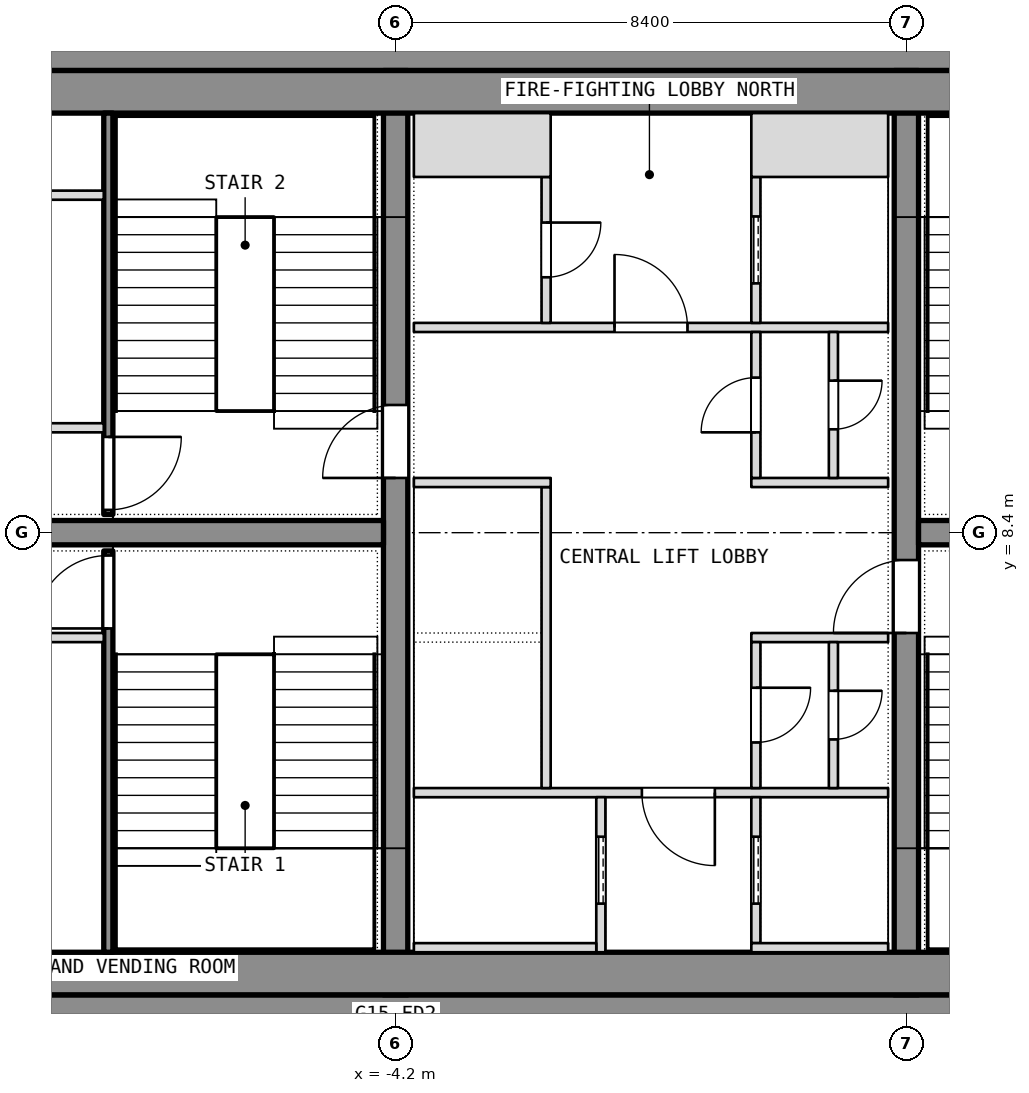
"""IFC4 building model, lengths in metres.
Left out: names, types, materials, properties, quantities, classifications, styles, units other than length and angle.
Written with IfcOpenShell. Run it as: python <this file> out.ifc"""

import sys

from ifc_helpers import new_model, si_unit, direction, frame, frame_2d, origin, place, context, subcontext, project, spatial, rectangle, extrude, element, fill, save


model = new_model("IFC4")
c1 = context("Model", 3, precision=1e-05, world=origin(), true_north=direction((0.0, 1.0)))
c2 = subcontext(c1, "Body", "Model", "MODEL_VIEW")
j1 = project(units=[si_unit("LENGTHUNIT", "METRE"), si_unit("PLANEANGLEUNIT", "RADIAN")], contexts=[c1])
p1 = place(None, origin())
s1 = spatial("IfcSite", under=j1, at=p1, CompositionType="ELEMENT")
p2 = place(p1, origin())
s2 = spatial("IfcBuilding", under=s1, at=p2, CompositionType="ELEMENT")
p3 = place(p2, frame((0.0, 0.0, 187.7)))
s3 = spatial("IfcBuildingStorey", under=s2, at=p3, CompositionType="ELEMENT", Elevation=187.7)
for number, where, z_axis, x_axis in (
    (1, (-11.1, 0.4, 0.0), (0.0, 0.0, 1.0), (1.0, 0.0, 0.0)),
    (2, (-11.1, 16.4, 0.0), (0.0, 0.0, 1.0), (1.0, 0.0, 0.0)),
):
    element("IfcWall", number, at=place(p3, frame(where, z_axis=z_axis, x_axis=x_axis)), inside=s3, PredefinedType="SHEAR", context=c2, shape_type="SweptSolid", body=[
        extrude(rectangle(XDim=22.2, YDim=0.8, at=frame_2d((11.1, 0.0))), origin(), (0.0, 0.0, 1.0), 3.6),
    ])
p4 = place(p3, frame((-4.2, 0.8, 0.0), z_axis=(0.0, 0.0, 1.0), x_axis=(0.0, 1.0, 0.0)))
e3 = element("IfcWall", 3, at=p4, inside=s3, PredefinedType="SHEAR", context=c2, shape_type="SweptSolid", body=[
    extrude(rectangle(XDim=15.2, YDim=0.4, at=frame_2d((7.6, 0.0))), origin(), (0.0, 0.0, 1.0), 3.6),
])
p5 = place(p4, frame((8.5, 0.0, 0.0)))
e4 = element("IfcOpeningElement", 4, at=p5, cuts=e3, PredefinedType="OPENING", context=c2, shape_type="SweptSolid", body=[
    extrude(rectangle(XDim=1.2, YDim=2.1, at=frame_2d((0.6, 1.05))), frame((0.0, 0.2, 0.0), z_axis=(0.0, -1.0, 0.0), x_axis=(1.0, 0.0, 0.0)), (0.0, 0.0, 1.0), 0.4),
])
p6 = place(p3, frame((4.2, 0.8, 0.0), z_axis=(0.0, 0.0, 1.0), x_axis=(0.0, 1.0, 0.0)))
e5 = element("IfcWall", 5, at=p6, inside=s3, PredefinedType="SHEAR", context=c2, shape_type="SweptSolid", body=[
    extrude(rectangle(XDim=15.2, YDim=0.4, at=frame_2d((7.6, 0.0))), origin(), (0.0, 0.0, 1.0), 3.6),
])
p7 = place(p6, frame((5.95, 0.0, 0.0)))
e6 = element("IfcOpeningElement", 6, at=p7, cuts=e5, PredefinedType="OPENING", context=c2, shape_type="SweptSolid", body=[
    extrude(rectangle(XDim=1.2, YDim=2.1, at=frame_2d((0.6, 1.05))), frame((0.0, 0.2, 0.0), z_axis=(0.0, -1.0, 0.0), x_axis=(1.0, 0.0, 0.0)), (0.0, 0.0, 1.0), 0.4),
])
for number, where, z_axis, x_axis in (
    (7, (-11.1, 8.4, 0.0), (0.0, 0.0, 1.0), (1.0, 0.0, 0.0)),
    (8, (4.4, 8.4, 0.0), (0.0, 0.0, 1.0), (1.0, 0.0, 0.0)),
):
    element("IfcWall", number, at=place(p3, frame(where, z_axis=z_axis, x_axis=x_axis)), inside=s3, PredefinedType="SHEAR", context=c2, shape_type="SweptSolid", body=[
        extrude(rectangle(XDim=6.7, YDim=0.4, at=frame_2d((3.35, 0.0))), origin(), (0.0, 0.0, 1.0), 3.6),
    ])
for number, where, z_axis, x_axis in (
    (9, (-11.1, 1.15, 0.0), (0.0, 0.0, 1.0), (1.0, 0.0, 0.0)),
    (10, (-11.1, 15.65, 0.0), (0.0, 0.0, 1.0), (1.0, 0.0, 0.0)),
):
    element("IfcWall", number, at=place(p3, frame(where, z_axis=z_axis, x_axis=x_axis)), inside=s3, PredefinedType="PARTITIONING", context=c2, shape_type="SweptSolid", body=[
        extrude(rectangle(XDim=22.2, YDim=0.7, at=frame_2d((11.1, 0.0))), origin(), (0.0, 0.0, 1.0), 3.34),
    ])
p8 = place(p3, frame((-8.925, 1.5, 0.0), z_axis=(0.0, 0.0, 1.0), x_axis=(0.0, 1.0, 0.0)))
e11 = element("IfcWall", 11, at=p8, inside=s3, PredefinedType="SHEAR", context=c2, shape_type="SweptSolid", body=[
    extrude(rectangle(XDim=6.6, YDim=0.15, at=frame_2d((3.3, 0.0))), origin(), (0.0, 0.0, 1.0), 3.34),
])
p9 = place(p8, frame((5.325, 0.0, 0.0)))
e12 = element("IfcOpeningElement", 12, at=p9, cuts=e11, PredefinedType="OPENING", context=c2, shape_type="SweptSolid", body=[
    extrude(rectangle(XDim=1.2, YDim=2.1, at=frame_2d((0.6, 1.05))), frame((0.0, 0.075, 0.0), z_axis=(0.0, -1.0, 0.0), x_axis=(1.0, 0.0, 0.0)), (0.0, 0.0, 1.0), 0.15),
])
p10 = place(p3, frame((-11.1, 6.675, 0.0), z_axis=(0.0, 0.0, 1.0), x_axis=(1.0, 0.0, 0.0)))
e13 = element("IfcWall", 13, at=p10, inside=s3, PredefinedType="PARTITIONING", context=c2, shape_type="SweptSolid", body=[
    extrude(rectangle(XDim=2.1, YDim=0.15, at=frame_2d((1.05, 0.0))), origin(), (0.0, 0.0, 1.0), 3.34),
])
p11 = place(p3, frame((-8.925, 8.7, 0.0), z_axis=(0.0, 0.0, 1.0), x_axis=(0.0, 1.0, 0.0)))
e14 = element("IfcWall", 14, at=p11, inside=s3, PredefinedType="SHEAR", context=c2, shape_type="SweptSolid", body=[
    extrude(rectangle(XDim=6.6, YDim=0.15, at=frame_2d((3.3, 0.0))), origin(), (0.0, 0.0, 1.0), 3.34),
])
p12 = place(p11, frame((0.075, 0.0, 0.0)))
e15 = element("IfcOpeningElement", 15, at=p12, cuts=e14, PredefinedType="OPENING", context=c2, shape_type="SweptSolid", body=[
    extrude(rectangle(XDim=1.2, YDim=2.1, at=frame_2d((0.6, 1.05))), frame((0.0, 0.075, 0.0), z_axis=(0.0, -1.0, 0.0), x_axis=(1.0, 0.0, 0.0)), (0.0, 0.0, 1.0), 0.15),
])
for number, where, z_axis, x_axis in (
    (16, (-11.1, 10.125, 0.0), (0.0, 0.0, 1.0), (1.0, 0.0, 0.0)),
    (17, (-11.1, 13.95, 0.0), (0.0, 0.0, 1.0), (1.0, 0.0, 0.0)),
):
    element("IfcWall", number, at=place(p3, frame(where, z_axis=z_axis, x_axis=x_axis)), inside=s3, PredefinedType="PARTITIONING", context=c2, shape_type="SweptSolid", body=[
        extrude(rectangle(XDim=2.1, YDim=0.15, at=frame_2d((1.05, 0.0))), origin(), (0.0, 0.0, 1.0), 3.34),
    ])
p13 = place(p3, frame((-3.9, 4.125, 0.0), z_axis=(0.0, 0.0, 1.0), x_axis=(1.0, 0.0, 0.0)))
e18 = element("IfcWall", 18, at=p13, inside=s3, PredefinedType="PARTITIONING", context=c2, shape_type="SweptSolid", body=[
    extrude(rectangle(XDim=7.8, YDim=0.15, at=frame_2d((3.9, 0.0))), origin(), (0.0, 0.0, 1.0), 3.34),
])
p14 = place(p13, frame((3.75, 0.0, 0.0)))
e19 = element("IfcOpeningElement", 19, at=p14, cuts=e18, PredefinedType="OPENING", context=c2, shape_type="SweptSolid", body=[
    extrude(rectangle(XDim=1.2, YDim=2.1, at=frame_2d((0.6, 1.05))), frame((0.0, 0.075, 0.0), z_axis=(0.0, -1.0, 0.0), x_axis=(1.0, 0.0, 0.0)), (0.0, 0.0, 1.0), 0.15),
])
p15 = place(p3, frame((-3.9, 11.775, 0.0), z_axis=(0.0, 0.0, 1.0), x_axis=(1.0, 0.0, 0.0)))
e20 = element("IfcWall", 20, at=p15, inside=s3, PredefinedType="PARTITIONING", context=c2, shape_type="SweptSolid", body=[
    extrude(rectangle(XDim=7.8, YDim=0.15, at=frame_2d((3.9, 0.0))), origin(), (0.0, 0.0, 1.0), 3.34),
])
p16 = place(p15, frame((3.3, 0.0, 0.0)))
e21 = element("IfcOpeningElement", 21, at=p16, cuts=e20, PredefinedType="OPENING", context=c2, shape_type="SweptSolid", body=[
    extrude(rectangle(XDim=1.2, YDim=2.1, at=frame_2d((0.6, 1.05))), frame((0.0, 0.075, 0.0), z_axis=(0.0, -1.0, 0.0), x_axis=(1.0, 0.0, 0.0)), (0.0, 0.0, 1.0), 0.15),
])
p17 = place(p3, frame((-0.825, 1.5, 0.0), z_axis=(0.0, 0.0, 1.0), x_axis=(0.0, 1.0, 0.0)))
e22 = element("IfcWall", 22, at=p17, inside=s3, PredefinedType="SHEAR", context=c2, shape_type="SweptSolid", body=[
    extrude(rectangle(XDim=2.55, YDim=0.15, at=frame_2d((1.275, 0.0))), origin(), (0.0, 0.0, 1.0), 3.6),
])
p18 = place(p17, frame((0.8, 0.0, 0.0)))
e23 = element("IfcOpeningElement", 23, at=p18, cuts=e22, PredefinedType="OPENING", context=c2, shape_type="SweptSolid", body=[
    extrude(rectangle(XDim=1.1, YDim=2.1, at=frame_2d((0.55, 1.05))), frame((0.0, 0.075, 0.0), z_axis=(0.0, -1.0, 0.0), x_axis=(1.0, 0.0, 0.0)), (0.0, 0.0, 1.0), 0.15),
])
p19 = place(p3, frame((-3.9, 1.575, 0.0), z_axis=(0.0, 0.0, 1.0), x_axis=(1.0, 0.0, 0.0)))
e24 = element("IfcWall", 24, at=p19, inside=s3, PredefinedType="SHEAR", context=c2, shape_type="SweptSolid", body=[
    extrude(rectangle(XDim=3.0, YDim=0.15, at=frame_2d((1.5, 0.0))), origin(), (0.0, 0.0, 1.0), 3.6),
])
p20 = place(p3, frame((-1.725, 4.2, 0.0), z_axis=(0.0, 0.0, 1.0), x_axis=(0.0, 1.0, 0.0)))
e25 = element("IfcWall", 25, at=p20, inside=s3, PredefinedType="SHEAR", context=c2, shape_type="SweptSolid", body=[
    extrude(rectangle(XDim=4.95, YDim=0.15, at=frame_2d((2.475, 0.0))), origin(), (0.0, 0.0, 1.0), 3.6),
])
p21 = place(p3, frame((-3.9, 9.225, 0.0), z_axis=(0.0, 0.0, 1.0), x_axis=(1.0, 0.0, 0.0)))
e26 = element("IfcWall", 26, at=p21, inside=s3, PredefinedType="SHEAR", context=c2, shape_type="SweptSolid", body=[
    extrude(rectangle(XDim=2.25, YDim=0.15, at=frame_2d((1.125, 0.0))), origin(), (0.0, 0.0, 1.0), 3.6),
])
p22 = place(p3, frame((-1.725, 11.85, 0.0), z_axis=(0.0, 0.0, 1.0), x_axis=(0.0, 1.0, 0.0)))
e27 = element("IfcWall", 27, at=p22, inside=s3, PredefinedType="PARTITIONING", context=c2, shape_type="SweptSolid", body=[
    extrude(rectangle(XDim=2.4, YDim=0.15, at=frame_2d((1.2, 0.0))), origin(), (0.0, 0.0, 1.0), 3.34),
])
p23 = place(p22, frame((0.75, 0.0, 0.0)))
e28 = element("IfcOpeningElement", 28, at=p23, cuts=e27, PredefinedType="OPENING", context=c2, shape_type="SweptSolid", body=[
    extrude(rectangle(XDim=0.9, YDim=2.1, at=frame_2d((0.45, 1.05))), frame((0.0, 0.075, 0.0), z_axis=(0.0, -1.0, 0.0), x_axis=(1.0, 0.0, 0.0)), (0.0, 0.0, 1.0), 0.15),
])
p24 = place(p3, frame((-3.9, 14.775, 0.0), z_axis=(0.0, 0.0, 1.0), x_axis=(1.0, 0.0, 0.0)))
e29 = element("IfcWall", 29, at=p24, inside=s3, PredefinedType="PARTITIONING", context=c2, shape_type="SweptSolid", body=[
    extrude(rectangle(XDim=2.25, YDim=1.05, at=frame_2d((1.125, 0.0))), origin(), (0.0, 0.0, 1.0), 3.34),
])
p25 = place(p3, frame((1.725, 1.65, 0.0), z_axis=(0.0, 0.0, 1.0), x_axis=(0.0, 1.0, 0.0)))
e30 = element("IfcWall", 30, at=p25, inside=s3, PredefinedType="SHEAR", context=c2, shape_type="SweptSolid", body=[
    extrude(rectangle(XDim=2.4, YDim=0.15, at=frame_2d((1.2, 0.0))), origin(), (0.0, 0.0, 1.0), 3.6),
])
p26 = place(p25, frame((0.65, 0.0, 0.0)))
e31 = element("IfcOpeningElement", 31, at=p26, cuts=e30, PredefinedType="OPENING", context=c2, shape_type="SweptSolid", body=[
    extrude(rectangle(XDim=1.1, YDim=2.1, at=frame_2d((0.55, 1.05))), frame((0.0, 0.075, 0.0), z_axis=(0.0, -1.0, 0.0), x_axis=(1.0, 0.0, 0.0)), (0.0, 0.0, 1.0), 0.15),
])
p27 = place(p3, frame((1.65, 1.575, 0.0), z_axis=(0.0, 0.0, 1.0), x_axis=(1.0, 0.0, 0.0)))
e32 = element("IfcWall", 32, at=p27, inside=s3, PredefinedType="SHEAR", context=c2, shape_type="SweptSolid", body=[
    extrude(rectangle(XDim=2.25, YDim=0.15, at=frame_2d((1.125, 0.0))), origin(), (0.0, 0.0, 1.0), 3.6),
])
p28 = place(p3, frame((1.725, 11.85, 0.0), z_axis=(0.0, 0.0, 1.0), x_axis=(0.0, 1.0, 0.0)))
e33 = element("IfcWall", 33, at=p28, inside=s3, PredefinedType="SHEAR", context=c2, shape_type="SweptSolid", body=[
    extrude(rectangle(XDim=2.4, YDim=0.15, at=frame_2d((1.2, 0.0))), origin(), (0.0, 0.0, 1.0), 3.6),
])
p29 = place(p28, frame((0.65, 0.0, 0.0)))
e34 = element("IfcOpeningElement", 34, at=p29, cuts=e33, PredefinedType="OPENING", context=c2, shape_type="SweptSolid", body=[
    extrude(rectangle(XDim=1.1, YDim=2.1, at=frame_2d((0.55, 1.05))), frame((0.0, 0.075, 0.0), z_axis=(0.0, -1.0, 0.0), x_axis=(1.0, 0.0, 0.0)), (0.0, 0.0, 1.0), 0.15),
])
p30 = place(p3, frame((1.65, 14.775, 0.0), z_axis=(0.0, 0.0, 1.0), x_axis=(1.0, 0.0, 0.0)))
e35 = element("IfcWall", 35, at=p30, inside=s3, PredefinedType="SHEAR", context=c2, shape_type="SweptSolid", body=[
    extrude(rectangle(XDim=2.25, YDim=1.05, at=frame_2d((1.125, 0.0))), origin(), (0.0, 0.0, 1.0), 3.6),
])
for number, where, z_axis, x_axis in (
    (36, (1.65, 6.675, 0.0), (0.0, 0.0, 1.0), (1.0, 0.0, 0.0)),
    (37, (1.65, 9.225, 0.0), (0.0, 0.0, 1.0), (1.0, 0.0, 0.0)),
):
    element("IfcWall", number, at=place(p3, frame(where, z_axis=z_axis, x_axis=x_axis)), inside=s3, PredefinedType="PARTITIONING", context=c2, shape_type="SweptSolid", body=[
        extrude(rectangle(XDim=2.25, YDim=0.15, at=frame_2d((1.125, 0.0))), origin(), (0.0, 0.0, 1.0), 3.34),
    ])
p31 = place(p3, frame((1.725, 4.2, 0.0), z_axis=(0.0, 0.0, 1.0), x_axis=(0.0, 1.0, 0.0)))
e38 = element("IfcWall", 38, at=p31, inside=s3, PredefinedType="PARTITIONING", context=c2, shape_type="SweptSolid", body=[
    extrude(rectangle(XDim=2.4, YDim=0.15, at=frame_2d((1.2, 0.0))), origin(), (0.0, 0.0, 1.0), 3.34),
])
p32 = place(p31, frame((0.75, 0.0, 0.0)))
e39 = element("IfcOpeningElement", 39, at=p32, cuts=e38, PredefinedType="OPENING", context=c2, shape_type="SweptSolid", body=[
    extrude(rectangle(XDim=0.9, YDim=2.1, at=frame_2d((0.45, 1.05))), frame((0.0, 0.075, 0.0), z_axis=(0.0, -1.0, 0.0), x_axis=(1.0, 0.0, 0.0)), (0.0, 0.0, 1.0), 0.15),
])
p33 = place(p3, frame((1.725, 9.3, 0.0), z_axis=(0.0, 0.0, 1.0), x_axis=(0.0, 1.0, 0.0)))
e40 = element("IfcWall", 40, at=p33, inside=s3, PredefinedType="PARTITIONING", context=c2, shape_type="SweptSolid", body=[
    extrude(rectangle(XDim=2.4, YDim=0.15, at=frame_2d((1.2, 0.0))), origin(), (0.0, 0.0, 1.0), 3.34),
])
p34 = place(p33, frame((0.75, 0.0, 0.0)))
e41 = element("IfcOpeningElement", 41, at=p34, cuts=e40, PredefinedType="OPENING", context=c2, shape_type="SweptSolid", body=[
    extrude(rectangle(XDim=0.9, YDim=2.1, at=frame_2d((0.45, 1.05))), frame((0.0, 0.075, 0.0), z_axis=(0.0, -1.0, 0.0), x_axis=(1.0, 0.0, 0.0)), (0.0, 0.0, 1.0), 0.15),
])
p35 = place(p3, frame((3.0, 4.2, 0.0), z_axis=(0.0, 0.0, 1.0), x_axis=(0.0, 1.0, 0.0)))
e42 = element("IfcWall", 42, at=p35, inside=s3, PredefinedType="PARTITIONING", context=c2, shape_type="SweptSolid", body=[
    extrude(rectangle(XDim=2.4, YDim=0.15, at=frame_2d((1.2, 0.0))), origin(), (0.0, 0.0, 1.0), 3.34),
])
p36 = place(p35, frame((0.8, 0.0, 0.0)))
e43 = element("IfcOpeningElement", 43, at=p36, cuts=e42, PredefinedType="OPENING", context=c2, shape_type="SweptSolid", body=[
    extrude(rectangle(XDim=0.8, YDim=2.1, at=frame_2d((0.4, 1.05))), frame((0.0, 0.075, 0.0), z_axis=(0.0, -1.0, 0.0), x_axis=(1.0, 0.0, 0.0)), (0.0, 0.0, 1.0), 0.15),
])
p37 = place(p3, frame((3.0, 9.3, 0.0), z_axis=(0.0, 0.0, 1.0), x_axis=(0.0, 1.0, 0.0)))
e44 = element("IfcWall", 44, at=p37, inside=s3, PredefinedType="PARTITIONING", context=c2, shape_type="SweptSolid", body=[
    extrude(rectangle(XDim=2.4, YDim=0.15, at=frame_2d((1.2, 0.0))), origin(), (0.0, 0.0, 1.0), 3.34),
])
p38 = place(p37, frame((0.8, 0.0, 0.0)))
e45 = element("IfcOpeningElement", 45, at=p38, cuts=e44, PredefinedType="OPENING", context=c2, shape_type="SweptSolid", body=[
    extrude(rectangle(XDim=0.8, YDim=2.1, at=frame_2d((0.4, 1.05))), frame((0.0, 0.075, 0.0), z_axis=(0.0, -1.0, 0.0), x_axis=(1.0, 0.0, 0.0)), (0.0, 0.0, 1.0), 0.15),
])
p39 = place(p9, origin())
e46 = element("IfcDoor", 46, at=p39, inside=s3, OperationType="SINGLE_SWING_LEFT", PredefinedType="DOOR", context=c2, shape_type="SweptSolid", body=[
    extrude(rectangle(XDim=1.2, YDim=2.1, at=frame_2d((0.6, 1.05))), frame((0.0, 0.025, 0.0), z_axis=(0.0, -1.0, 0.0), x_axis=(1.0, 0.0, 0.0)), (0.0, 0.0, 1.0), 0.05),
])
fill(e12, e46)
p40 = place(p12, origin())
e47 = element("IfcDoor", 47, at=p40, inside=s3, OperationType="SINGLE_SWING_LEFT", PredefinedType="DOOR", context=c2, shape_type="SweptSolid", body=[
    extrude(rectangle(XDim=1.2, YDim=2.1, at=frame_2d((0.6, 1.05))), frame((0.0, 0.025, 0.0), z_axis=(0.0, -1.0, 0.0), x_axis=(1.0, 0.0, 0.0)), (0.0, 0.0, 1.0), 0.05),
])
fill(e15, e47)
p41 = place(p32, origin())
e48 = element("IfcDoor", 48, at=p41, inside=s3, OperationType="SINGLE_SWING_LEFT", PredefinedType="DOOR", context=c2, shape_type="SweptSolid", body=[
    extrude(rectangle(XDim=0.9, YDim=2.1, at=frame_2d((0.45, 1.05))), frame((0.0, 0.025, 0.0), z_axis=(0.0, -1.0, 0.0), x_axis=(1.0, 0.0, 0.0)), (0.0, 0.0, 1.0), 0.05),
])
fill(e39, e48)
p42 = place(p36, origin())
e49 = element("IfcDoor", 49, at=p42, inside=s3, OperationType="SINGLE_SWING_LEFT", PredefinedType="DOOR", context=c2, shape_type="SweptSolid", body=[
    extrude(rectangle(XDim=0.8, YDim=2.1, at=frame_2d((0.4, 1.05))), frame((0.0, 0.025, 0.0), z_axis=(0.0, -1.0, 0.0), x_axis=(1.0, 0.0, 0.0)), (0.0, 0.0, 1.0), 0.05),
])
fill(e43, e49)
p43 = place(p34, origin())
e50 = element("IfcDoor", 50, at=p43, inside=s3, OperationType="SINGLE_SWING_LEFT", PredefinedType="DOOR", context=c2, shape_type="SweptSolid", body=[
    extrude(rectangle(XDim=0.9, YDim=2.1, at=frame_2d((0.45, 1.05))), frame((0.0, 0.025, 0.0), z_axis=(0.0, -1.0, 0.0), x_axis=(1.0, 0.0, 0.0)), (0.0, 0.0, 1.0), 0.05),
])
fill(e41, e50)
p44 = place(p38, origin())
e51 = element("IfcDoor", 51, at=p44, inside=s3, OperationType="SINGLE_SWING_LEFT", PredefinedType="DOOR", context=c2, shape_type="SweptSolid", body=[
    extrude(rectangle(XDim=0.8, YDim=2.1, at=frame_2d((0.4, 1.05))), frame((0.0, 0.025, 0.0), z_axis=(0.0, -1.0, 0.0), x_axis=(1.0, 0.0, 0.0)), (0.0, 0.0, 1.0), 0.05),
])
fill(e45, e51)
p45 = place(p18, origin())
e52 = element("IfcDoor", 52, at=p45, inside=s3, OperationType="SLIDING_TO_LEFT", PredefinedType="DOOR", context=c2, shape_type="SweptSolid", body=[
    extrude(rectangle(XDim=1.1, YDim=2.1, at=frame_2d((0.55, 1.05))), frame((0.0, 0.025, 0.0), z_axis=(0.0, -1.0, 0.0), x_axis=(1.0, 0.0, 0.0)), (0.0, 0.0, 1.0), 0.05),
])
fill(e23, e52)
p46 = place(p26, origin())
e53 = element("IfcDoor", 53, at=p46, inside=s3, OperationType="SLIDING_TO_LEFT", PredefinedType="DOOR", context=c2, shape_type="SweptSolid", body=[
    extrude(rectangle(XDim=1.1, YDim=2.1, at=frame_2d((0.55, 1.05))), frame((0.0, 0.025, 0.0), z_axis=(0.0, -1.0, 0.0), x_axis=(1.0, 0.0, 0.0)), (0.0, 0.0, 1.0), 0.05),
])
fill(e31, e53)
p47 = place(p29, origin())
e54 = element("IfcDoor", 54, at=p47, inside=s3, OperationType="SLIDING_TO_LEFT", PredefinedType="DOOR", context=c2, shape_type="SweptSolid", body=[
    extrude(rectangle(XDim=1.1, YDim=2.1, at=frame_2d((0.55, 1.05))), frame((0.0, 0.025, 0.0), z_axis=(0.0, -1.0, 0.0), x_axis=(1.0, 0.0, 0.0)), (0.0, 0.0, 1.0), 0.05),
])
fill(e34, e54)
p48 = place(p14, origin())
e55 = element("IfcDoor", 55, at=p48, inside=s3, OperationType="SINGLE_SWING_LEFT", PredefinedType="DOOR", context=c2, shape_type="SweptSolid", body=[
    extrude(rectangle(XDim=1.2, YDim=2.1, at=frame_2d((0.6, 1.05))), frame((0.0, 0.025, 0.0), z_axis=(0.0, -1.0, 0.0), x_axis=(1.0, 0.0, 0.0)), (0.0, 0.0, 1.0), 0.05),
])
fill(e19, e55)
p49 = place(p16, origin())
e56 = element("IfcDoor", 56, at=p49, inside=s3, OperationType="SINGLE_SWING_LEFT", PredefinedType="DOOR", context=c2, shape_type="SweptSolid", body=[
    extrude(rectangle(XDim=1.2, YDim=2.1, at=frame_2d((0.6, 1.05))), frame((0.0, 0.025, 0.0), z_axis=(0.0, -1.0, 0.0), x_axis=(1.0, 0.0, 0.0)), (0.0, 0.0, 1.0), 0.05),
])
fill(e21, e56)
p50 = place(p23, origin())
e57 = element("IfcDoor", 57, at=p50, inside=s3, OperationType="SINGLE_SWING_LEFT", PredefinedType="DOOR", context=c2, shape_type="SweptSolid", body=[
    extrude(rectangle(XDim=0.9, YDim=2.1, at=frame_2d((0.45, 1.05))), frame((0.0, 0.025, 0.0), z_axis=(0.0, -1.0, 0.0), x_axis=(1.0, 0.0, 0.0)), (0.0, 0.0, 1.0), 0.05),
])
fill(e28, e57)
p51 = place(p5, origin())
e58 = element("IfcDoor", 58, at=p51, inside=s3, OperationType="SINGLE_SWING_LEFT", PredefinedType="DOOR", context=c2, shape_type="SweptSolid", body=[
    extrude(rectangle(XDim=1.2, YDim=2.1, at=frame_2d((0.6, 1.05))), frame((0.0, 0.025, 0.0), z_axis=(0.0, -1.0, 0.0), x_axis=(1.0, 0.0, 0.0)), (0.0, 0.0, 1.0), 0.05),
])
fill(e4, e58)
p52 = place(p7, origin())
e59 = element("IfcDoor", 59, at=p52, inside=s3, OperationType="SINGLE_SWING_LEFT", PredefinedType="DOOR", context=c2, shape_type="SweptSolid", body=[
    extrude(rectangle(XDim=1.2, YDim=2.1, at=frame_2d((0.6, 1.05))), frame((0.0, 0.025, 0.0), z_axis=(0.0, -1.0, 0.0), x_axis=(1.0, 0.0, 0.0)), (0.0, 0.0, 1.0), 0.05),
])
fill(e6, e59)
save(model, sys.argv[1])
